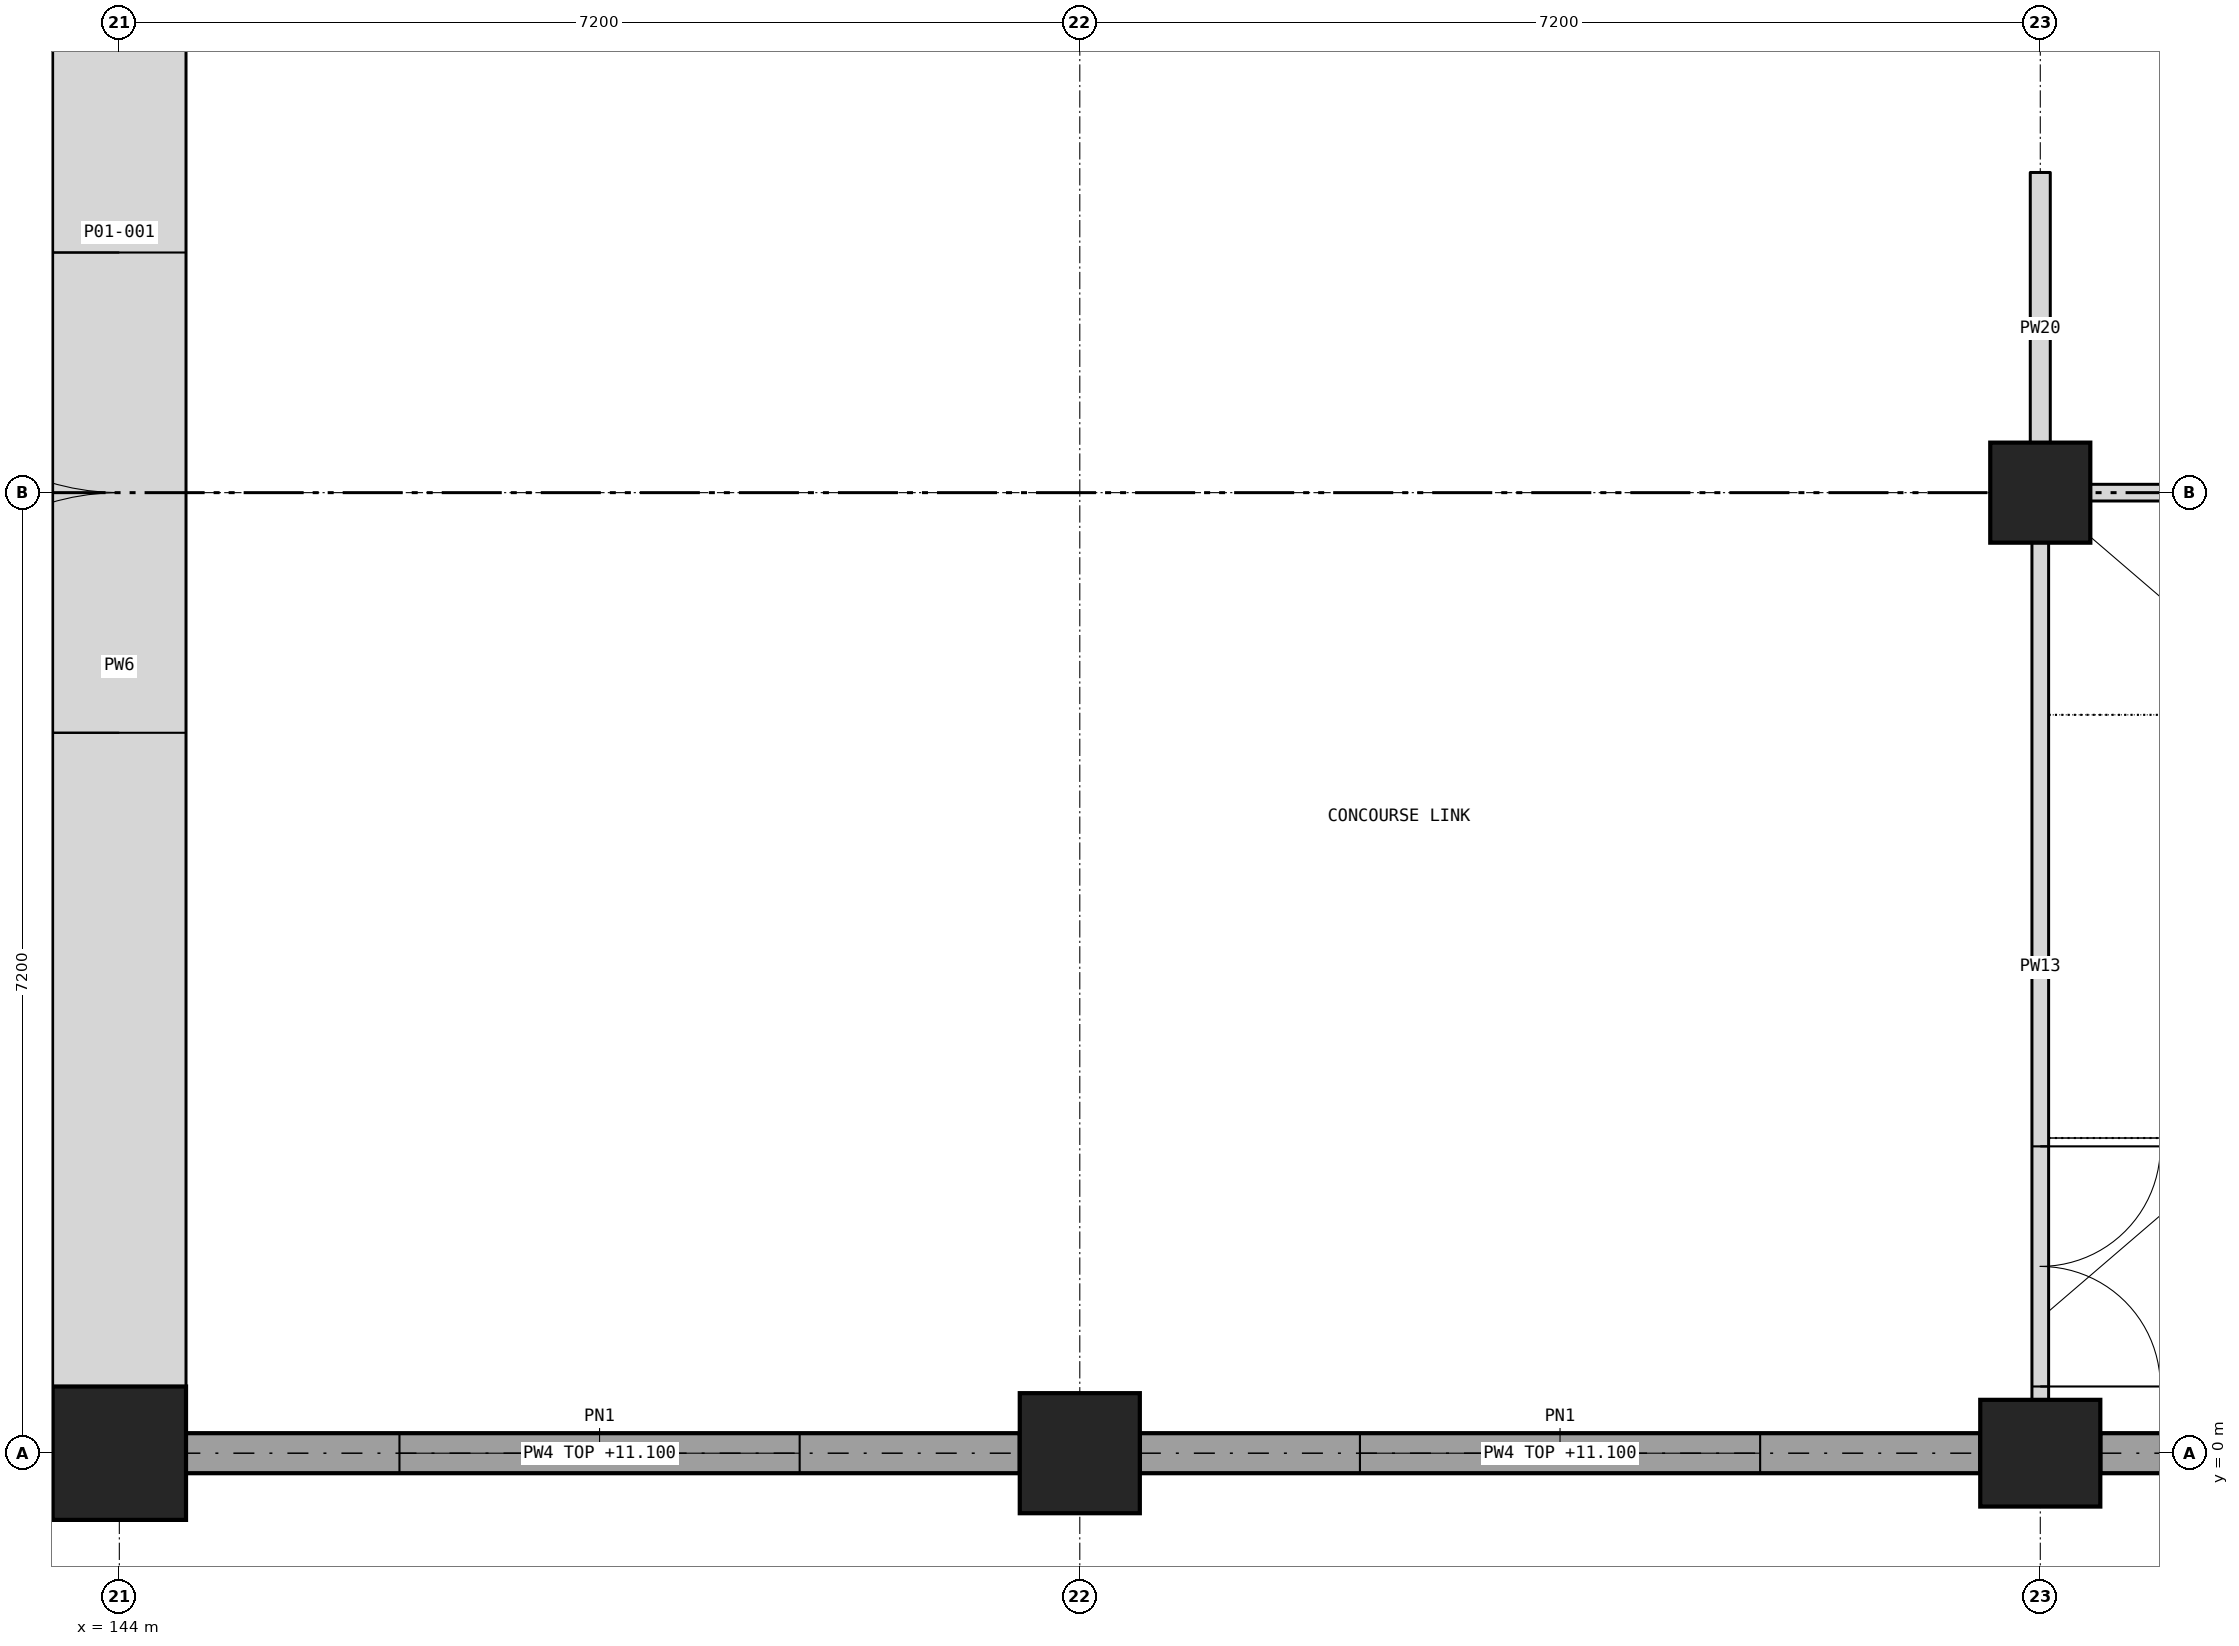
"""IFC4 building model, lengths in metres.
Left out: names, types, materials, properties, quantities, classifications, styles, units other than length and angle.
Written with IfcOpenShell. Run it as: python <this file> out.ifc"""

import sys

from ifc_helpers import new_model, si_unit, direction, frame, frame_2d, origin, origin_2d, place, context, subcontext, project, spatial, rectangle, extrude, element, fill, save


model = new_model("IFC4")
c1 = context("Model", 3, precision=1e-05, world=origin(), true_north=direction((0.0, 1.0)))
c2 = subcontext(c1, "Body", "Model", "MODEL_VIEW")
j1 = project(units=[si_unit("LENGTHUNIT", "METRE"), si_unit("PLANEANGLEUNIT", "RADIAN")], contexts=[c1])
p1 = place(None, origin())
s1 = spatial("IfcSite", under=j1, at=p1, CompositionType="ELEMENT")
p2 = place(p1, origin())
s2 = spatial("IfcBuilding", under=s1, at=p2, CompositionType="ELEMENT")
p3 = place(p2, frame((0.0, 0.0, 6.0)))
s3 = spatial("IfcBuildingStorey", under=s2, at=p3, CompositionType="ELEMENT", Elevation=6.0)
p4 = place(p3, frame((137.075, 0.2, 0.0), z_axis=(0.0, 0.0, 1.0), x_axis=(1.0, 0.0, 0.0)))
e1 = element("IfcWall", 1, at=p4, inside=s3, PredefinedType="SOLIDWALL", context=c2, shape_type="SweptSolid", body=[
    extrude(rectangle(XDim=6.475, YDim=0.4, at=frame_2d((3.238, 0.0))), origin(), (0.0, 0.0, 1.0), 5.725),
])
p5 = place(p3, frame((144.0, 0.0, 0.0), z_axis=(0.0, 0.0, 1.0), x_axis=(1.0, 0.0, 0.0)))
e2 = element("IfcColumn", 2, at=p5, inside=s3, PredefinedType="COLUMN", context=c2, shape_type="SweptSolid", body=[
    extrude(rectangle(XDim=1.0, YDim=1.0, at=origin_2d()), origin(), (0.0, 0.0, 1.0), 6.0),
])
p6 = place(p3, frame((151.2, 0.0, 0.0), z_axis=(0.0, 0.0, 1.0), x_axis=(1.0, 0.0, 0.0)))
e3 = element("IfcColumn", 3, at=p6, inside=s3, PredefinedType="COLUMN", context=c2, shape_type="SweptSolid", body=[
    extrude(rectangle(XDim=0.9, YDim=0.9, at=origin_2d()), origin(), (0.0, 0.0, 1.0), 6.0),
])
p7 = place(p3, frame((158.4, 0.0, 0.0), z_axis=(0.0, 0.0, 1.0), x_axis=(1.0, 0.0, 0.0)))
e4 = element("IfcColumn", 4, at=p7, inside=s3, PredefinedType="COLUMN", context=c2, shape_type="SweptSolid", body=[
    extrude(rectangle(XDim=0.9, YDim=0.8, at=origin_2d()), origin(), (0.0, 0.0, 1.0), 6.0),
])
p8 = place(p3, frame((158.4, 7.2, 0.0), z_axis=(0.0, 0.0, 1.0), x_axis=(1.0, 0.0, 0.0)))
e5 = element("IfcColumn", 5, at=p8, inside=s3, PredefinedType="COLUMN", context=c2, shape_type="SweptSolid", body=[
    extrude(rectangle(XDim=0.75, YDim=0.75, at=origin_2d()), origin(), (0.0, 0.0, 1.0), 6.0),
])
p9 = place(p3, frame((144.0, 0.4, 0.0), z_axis=(0.0, 0.0, 1.0), x_axis=(0.0, 1.0, 0.0)))
e6 = element("IfcWall", 6, at=p9, inside=s3, PredefinedType="SOLIDWALL", context=c2, shape_type="SweptSolid", body=[
    extrude(rectangle(XDim=11.0, YDim=1.0, at=frame_2d((5.5, 0.0))), origin(), (0.0, 0.0, 1.0), 5.5),
])
p10 = place(p9, frame((5.0, 0.0, 0.0)))
e7 = element("IfcOpeningElement", 7, at=p10, cuts=e6, PredefinedType="OPENING", context=c2, shape_type="SweptSolid", body=[
    extrude(rectangle(XDim=3.6, YDim=2.4, at=frame_2d((1.8, 1.2))), frame((0.0, 0.51, 0.0), z_axis=(0.0, -1.0, 0.0), x_axis=(1.0, 0.0, 0.0)), (0.0, 0.0, 1.0), 1.02),
])
p11 = place(p3, frame((144.45, 0.0, 0.0), z_axis=(0.0, 0.0, 1.0), x_axis=(1.0, 0.0, 0.0)))
e8 = element("IfcWall", 8, at=p11, inside=s3, PredefinedType="SOLIDWALL", context=c2, shape_type="SweptSolid", body=[
    extrude(rectangle(XDim=6.3, YDim=0.3, at=frame_2d((3.15, 0.0))), origin(), (0.0, 0.0, 1.0), 5.1),
])
p12 = place(p11, frame((1.65, 0.0, 0.9)))
e9 = element("IfcOpeningElement", 9, at=p12, cuts=e8, PredefinedType="OPENING", context=c2, shape_type="SweptSolid", body=[
    extrude(rectangle(XDim=3.0, YDim=2.4, at=frame_2d((1.5, 1.2))), frame((0.0, 0.16, 0.0), z_axis=(0.0, -1.0, 0.0), x_axis=(1.0, 0.0, 0.0)), (0.0, 0.0, 1.0), 0.32),
])
p13 = place(p3, frame((151.65, 0.0, 0.0), z_axis=(0.0, 0.0, 1.0), x_axis=(1.0, 0.0, 0.0)))
e10 = element("IfcWall", 10, at=p13, inside=s3, PredefinedType="SOLIDWALL", context=c2, shape_type="SweptSolid", body=[
    extrude(rectangle(XDim=6.3, YDim=0.3, at=frame_2d((3.15, 0.0))), origin(), (0.0, 0.0, 1.0), 5.1),
])
p14 = place(p13, frame((1.65, 0.0, 0.9)))
e11 = element("IfcOpeningElement", 11, at=p14, cuts=e10, PredefinedType="OPENING", context=c2, shape_type="SweptSolid", body=[
    extrude(rectangle(XDim=3.0, YDim=2.4, at=frame_2d((1.5, 1.2))), frame((0.0, 0.16, 0.0), z_axis=(0.0, -1.0, 0.0), x_axis=(1.0, 0.0, 0.0)), (0.0, 0.0, 1.0), 0.32),
])
p15 = place(p3, frame((158.85, 0.0, 0.0), z_axis=(0.0, 0.0, 1.0), x_axis=(1.0, 0.0, 0.0)))
e12 = element("IfcWall", 12, at=p15, inside=s3, PredefinedType="SOLIDWALL", context=c2, shape_type="SweptSolid", body=[
    extrude(rectangle(XDim=6.3, YDim=0.3, at=frame_2d((3.15, 0.0))), origin(), (0.0, 0.0, 1.0), 5.1),
])
p16 = place(p3, frame((158.4, 0.15, 0.0), z_axis=(0.0, 0.0, 1.0), x_axis=(0.0, 1.0, 0.0)))
e13 = element("IfcWall", 13, at=p16, inside=s3, PredefinedType="SOLIDWALL", context=c2, shape_type="SweptSolid", body=[
    extrude(rectangle(XDim=6.988, YDim=0.125, at=frame_2d((3.494, 0.0))), origin(), (0.0, 0.0, 1.0), 5.5),
])
p17 = place(p16, frame((0.35, 0.0, 0.0)))
e14 = element("IfcOpeningElement", 14, at=p17, cuts=e13, PredefinedType="OPENING", context=c2, shape_type="SweptSolid", body=[
    extrude(rectangle(XDim=1.8, YDim=2.1, at=frame_2d((0.9, 1.05))), frame((0.0, 0.073, 0.0), z_axis=(0.0, -1.0, 0.0), x_axis=(1.0, 0.0, 0.0)), (0.0, 0.0, 1.0), 0.145),
])
p18 = place(p3, frame((158.4, 7.262, 0.0), z_axis=(0.0, 0.0, 1.0), x_axis=(0.0, 1.0, 0.0)))
e15 = element("IfcWall", 15, at=p18, inside=s3, PredefinedType="PARTITIONING", context=c2, shape_type="SweptSolid", body=[
    extrude(rectangle(XDim=2.338, YDim=0.15, at=frame_2d((1.169, 0.0))), origin(), (0.0, 0.0, 1.0), 5.5),
])
p19 = place(p3, frame((158.337, 7.2, 0.0), z_axis=(0.0, 0.0, 1.0), x_axis=(1.0, 0.0, 0.0)))
e16 = element("IfcWall", 16, at=p19, inside=s3, PredefinedType="SOLIDWALL", context=c2, shape_type="SweptSolid", body=[
    extrude(rectangle(XDim=7.325, YDim=0.125, at=frame_2d((3.663, 0.0))), origin(), (0.0, 0.0, 1.0), 5.5),
])
p20 = place(p10, origin())
e17 = element("IfcDoor", 17, at=p20, inside=s3, OperationType="DOUBLE_DOOR_SINGLE_SWING", PredefinedType="DOOR", context=c2, shape_type="SweptSolid", body=[
    extrude(rectangle(XDim=3.6, YDim=2.4, at=frame_2d((1.8, 1.2))), frame((0.0, 0.025, 0.0), z_axis=(0.0, -1.0, 0.0), x_axis=(1.0, 0.0, 0.0)), (0.0, 0.0, 1.0), 0.05),
])
fill(e7, e17)
p21 = place(p12, origin())
e18 = element("IfcWindow", 18, at=p21, inside=s3, PartitioningType="DOUBLE_PANEL_VERTICAL", PredefinedType="WINDOW", context=c2, shape_type="SweptSolid", body=[
    extrude(rectangle(XDim=3.0, YDim=2.4, at=frame_2d((1.5, 1.2))), frame((0.0, 0.12, 0.0), z_axis=(0.0, -1.0, 0.0), x_axis=(1.0, 0.0, 0.0)), (0.0, 0.0, 1.0), 0.06),
])
fill(e9, e18)
p22 = place(p14, origin())
e19 = element("IfcWindow", 19, at=p22, inside=s3, PartitioningType="DOUBLE_PANEL_VERTICAL", PredefinedType="WINDOW", context=c2, shape_type="SweptSolid", body=[
    extrude(rectangle(XDim=3.0, YDim=2.4, at=frame_2d((1.5, 1.2))), frame((0.0, 0.12, 0.0), z_axis=(0.0, -1.0, 0.0), x_axis=(1.0, 0.0, 0.0)), (0.0, 0.0, 1.0), 0.06),
])
fill(e11, e19)
p23 = place(p17, frame((1.8, 0.0, 0.0), z_axis=(0.0, 0.0, 1.0), x_axis=(-1.0, 0.0, 0.0)))
e20 = element("IfcDoor", 20, at=p23, inside=s3, OperationType="DOUBLE_DOOR_SINGLE_SWING", PredefinedType="DOOR", context=c2, shape_type="SweptSolid", body=[
    extrude(rectangle(XDim=1.8, YDim=2.1, at=frame_2d((0.9, 1.05))), frame((0.0, 0.025, 0.0), z_axis=(0.0, -1.0, 0.0), x_axis=(1.0, 0.0, 0.0)), (0.0, 0.0, 1.0), 0.05),
])
fill(e14, e20)
save(model, sys.argv[1])
